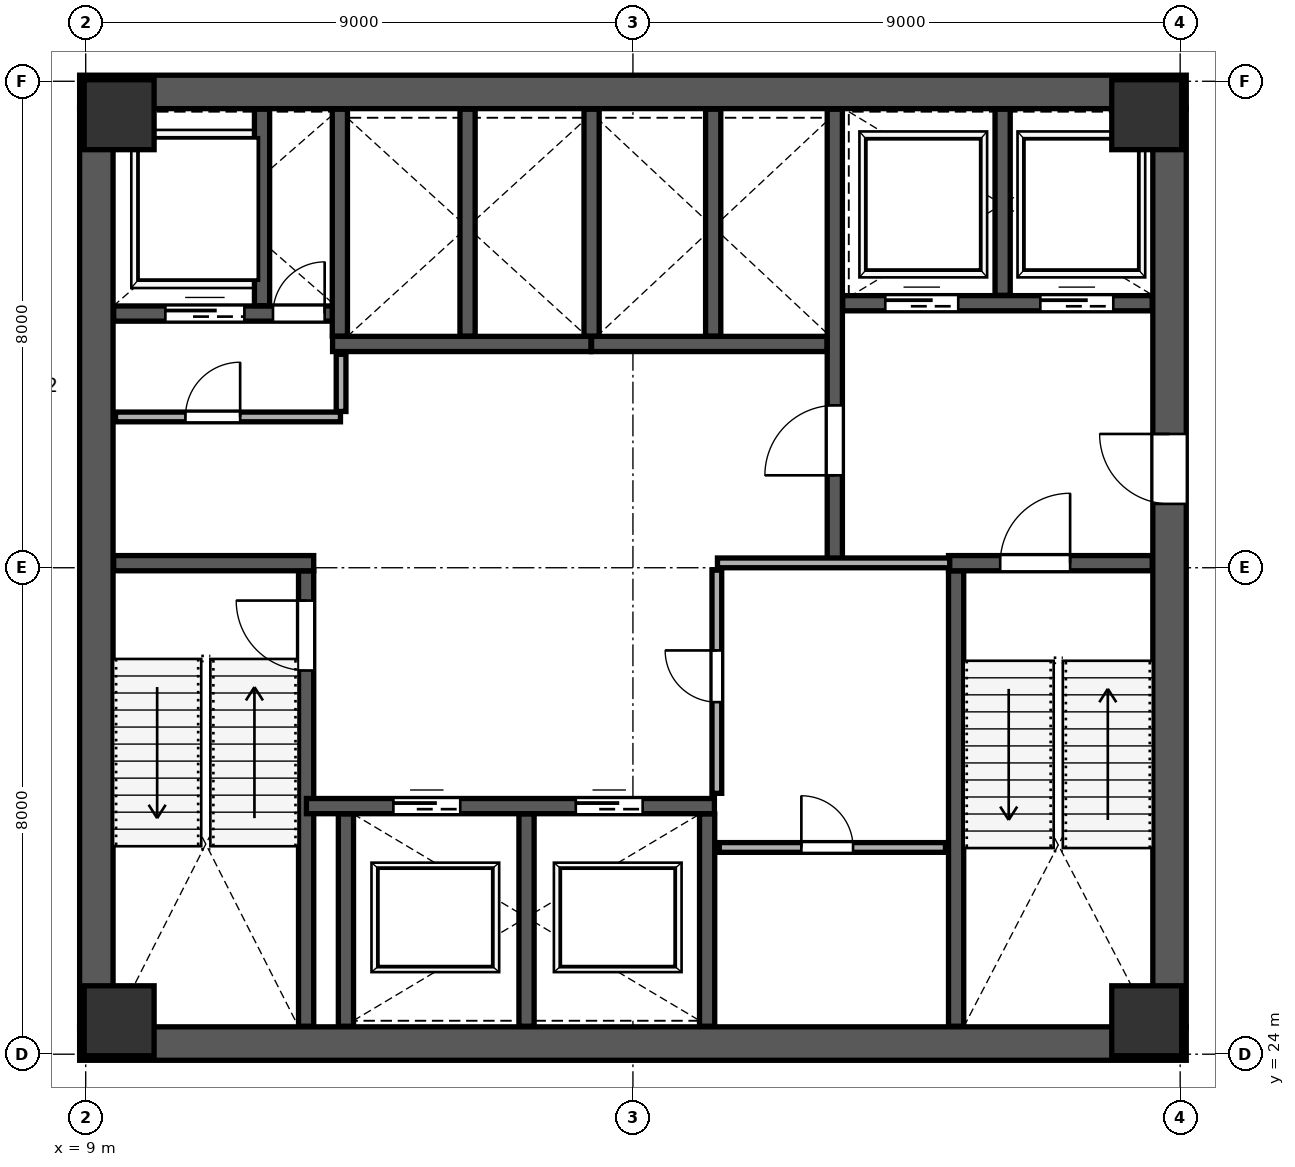
"""IFC4 building model, lengths in metres.
Left out: names, types, materials, properties, quantities, classifications, styles, units other than length and angle.
Written with IfcOpenShell. Run it as: python <this file> out.ifc"""

import sys

from ifc_helpers import new_model, si_unit, direction, frame, frame_2d, origin, origin_2d, place, context, subcontext, project, spatial, rectangle, extrude, source, transform, mapped, element, fill, save


model = new_model("IFC4")
c1 = context("Model", 3, precision=1e-05, world=origin(), true_north=direction((0.0, 1.0)))
c2 = subcontext(c1, "Body", "Model", "MODEL_VIEW")
j1 = project(units=[si_unit("LENGTHUNIT", "METRE"), si_unit("PLANEANGLEUNIT", "RADIAN")], contexts=[c1])
p1 = place(None, origin())
s1 = spatial("IfcSite", under=j1, at=p1, CompositionType="ELEMENT")
p2 = place(p1, origin())
s2 = spatial("IfcBuilding", under=s1, at=p2, CompositionType="ELEMENT")
p3 = place(p2, frame((0.0, 0.0, 100.0)))
s3 = spatial("IfcBuildingStorey", under=s2, at=p3, CompositionType="ELEMENT", Elevation=100.0)
m1 = source(origin(), c2, "Body", "SweptSolid", [
    extrude(rectangle(XDim=1.15, YDim=1.15, at=origin_2d()), origin(), (0.0, 0.0, 1.0), 4.198),
])
for number, where, z_axis, x_axis in (
    (1, (9.55, 24.55, 0.001), (0.0, 0.0, 1.0), (1.0, 0.0, 0.0)),
    (2, (26.45, 24.55, 0.001), (0.0, 0.0, 1.0), (1.0, 0.0, 0.0)),
    (3, (9.55, 39.45, 0.001), (0.0, 0.0, 1.0), (1.0, 0.0, 0.0)),
    (4, (26.45, 39.45, 0.001), (0.0, 0.0, 1.0), (1.0, 0.0, 0.0)),
):
    element("IfcColumn", number, at=place(p3, frame(where, z_axis=z_axis, x_axis=x_axis)), inside=s3, PredefinedType="COLUMN", context=c2, shape_type="MappedRepresentation", body=[
        mapped(m1, transform((0.0, 0.0, 0.0), scale=1.0)),
    ])
p4 = place(p3, frame((9.175, 24.45, 0.0), z_axis=(0.0, 0.0, 1.0), x_axis=(0.0, 1.0, 0.0)))
e5 = element("IfcWall", 5, at=p4, inside=s3, PredefinedType="SHEAR", context=c2, shape_type="SweptSolid", body=[
    extrude(rectangle(XDim=15.1, YDim=0.55, at=frame_2d((7.55, 0.0))), origin(), (0.0, 0.0, 1.0), 3.96),
])
p5 = place(p3, frame((26.825, 24.45, 0.0), z_axis=(0.0, 0.0, 1.0), x_axis=(0.0, 1.0, 0.0)))
e6 = element("IfcWall", 6, at=p5, inside=s3, PredefinedType="SHEAR", context=c2, shape_type="SweptSolid", body=[
    extrude(rectangle(XDim=15.1, YDim=0.55, at=frame_2d((7.55, 0.0))), origin(), (0.0, 0.0, 1.0), 3.96),
])
p6 = place(p5, frame((8.6, 0.0, 0.0)))
e7 = element("IfcOpeningElement", 7, at=p6, cuts=e6, PredefinedType="OPENING", context=c2, shape_type="SweptSolid", body=[
    extrude(rectangle(XDim=1.15, YDim=2.2, at=frame_2d((0.575, 1.1))), frame((0.0, 0.285, 0.0), z_axis=(0.0, -1.0, 0.0), x_axis=(1.0, 0.0, 0.0)), (0.0, 0.0, 1.0), 0.57),
])
for number, where, z_axis, x_axis in (
    (8, (8.9, 24.175, 0.0), (0.0, 0.0, 1.0), (1.0, 0.0, 0.0)),
    (9, (8.9, 39.825, 0.0), (0.0, 0.0, 1.0), (1.0, 0.0, 0.0)),
):
    element("IfcWall", number, at=place(p3, frame(where, z_axis=z_axis, x_axis=x_axis)), inside=s3, PredefinedType="SHEAR", context=c2, shape_type="SweptSolid", body=[
        extrude(rectangle(XDim=18.2, YDim=0.55, at=frame_2d((9.1, 0.0))), origin(), (0.0, 0.0, 1.0), 3.96),
    ])
p7 = place(p3, frame((12.625, 24.46, 0.0), z_axis=(0.0, 0.0, 1.0), x_axis=(0.0, 1.0, 0.0)))
e10 = element("IfcWall", 10, at=p7, inside=s3, PredefinedType="SHEAR", context=c2, shape_type="SweptSolid", body=[
    extrude(rectangle(XDim=7.49, YDim=0.25, at=frame_2d((3.745, 0.0))), origin(), (0.0, 0.0, 1.0), 3.96),
])
p8 = place(p7, frame((5.85, 0.0, 0.0)))
e11 = element("IfcOpeningElement", 11, at=p8, cuts=e10, PredefinedType="OPENING", context=c2, shape_type="SweptSolid", body=[
    extrude(rectangle(XDim=1.15, YDim=2.2, at=frame_2d((0.575, 1.1))), frame((0.0, 0.135, 0.0), z_axis=(0.0, -1.0, 0.0), x_axis=(1.0, 0.0, 0.0)), (0.0, 0.0, 1.0), 0.27),
])
p9 = place(p3, frame((9.46, 32.075, 0.0), z_axis=(0.0, 0.0, 1.0), x_axis=(1.0, 0.0, 0.0)))
e12 = element("IfcWall", 12, at=p9, inside=s3, PredefinedType="SHEAR", context=c2, shape_type="SweptSolid", body=[
    extrude(rectangle(XDim=3.29, YDim=0.25, at=frame_2d((1.645, 0.0))), origin(), (0.0, 0.0, 1.0), 3.96),
])
p10 = place(p3, frame((23.315, 24.46, 0.0), z_axis=(0.0, 0.0, 1.0), x_axis=(0.0, 1.0, 0.0)))
e13 = element("IfcWall", 13, at=p10, inside=s3, PredefinedType="SHEAR", context=c2, shape_type="SweptSolid", body=[
    extrude(rectangle(XDim=7.49, YDim=0.25, at=frame_2d((3.745, 0.0))), origin(), (0.0, 0.0, 1.0), 3.96),
])
p11 = place(p3, frame((23.19, 32.075, 0.0), z_axis=(0.0, 0.0, 1.0), x_axis=(1.0, 0.0, 0.0)))
e14 = element("IfcWall", 14, at=p11, inside=s3, PredefinedType="SHEAR", context=c2, shape_type="SweptSolid", body=[
    extrude(rectangle(XDim=3.35, YDim=0.25, at=frame_2d((1.675, 0.0))), origin(), (0.0, 0.0, 1.0), 3.96),
])
p12 = place(p11, frame((0.85, 0.0, 0.0)))
e15 = element("IfcOpeningElement", 15, at=p12, cuts=e14, PredefinedType="OPENING", context=c2, shape_type="SweptSolid", body=[
    extrude(rectangle(XDim=1.15, YDim=2.2, at=frame_2d((0.575, 1.1))), frame((0.0, 0.135, 0.0), z_axis=(0.0, -1.0, 0.0), x_axis=(1.0, 0.0, 0.0)), (0.0, 0.0, 1.0), 0.27),
])
p13 = place(p3, frame((21.32, 32.12, 0.0), z_axis=(0.0, 0.0, 1.0), x_axis=(0.0, 1.0, 0.0)))
e16 = element("IfcWall", 16, at=p13, inside=s3, PredefinedType="SHEAR", context=c2, shape_type="SweptSolid", body=[
    extrude(rectangle(XDim=7.42, YDim=0.25, at=frame_2d((3.71, 0.0))), origin(), (0.0, 0.0, 1.0), 3.96),
])
p14 = place(p13, frame((1.4, 0.0, 0.0)))
e17 = element("IfcOpeningElement", 17, at=p14, cuts=e16, PredefinedType="OPENING", context=c2, shape_type="SweptSolid", body=[
    extrude(rectangle(XDim=1.15, YDim=2.2, at=frame_2d((0.575, 1.1))), frame((0.0, 0.135, 0.0), z_axis=(0.0, -1.0, 0.0), x_axis=(1.0, 0.0, 0.0)), (0.0, 0.0, 1.0), 0.27),
])
p15 = place(p3, frame((9.46, 36.18, 0.0), z_axis=(0.0, 0.0, 1.0), x_axis=(1.0, 0.0, 0.0)))
e18 = element("IfcWall", 18, at=p15, inside=s3, PredefinedType="SHEAR", context=c2, shape_type="SweptSolid", body=[
    extrude(rectangle(XDim=3.79, YDim=0.25, at=frame_2d((1.895, 0.0))), origin(), (0.0, 0.0, 1.0), 3.96),
])
p16 = place(p15, frame((2.62, 0.0, 0.0)))
e19 = element("IfcOpeningElement", 19, at=p16, cuts=e18, PredefinedType="OPENING", context=c2, shape_type="SweptSolid", body=[
    extrude(rectangle(XDim=0.85, YDim=2.1, at=frame_2d((0.425, 1.05))), frame((0.0, 0.135, 0.0), z_axis=(0.0, -1.0, 0.0), x_axis=(1.0, 0.0, 0.0)), (0.0, 0.0, 1.0), 0.27),
])
p17 = place(p15, frame((0.85, 0.0, 0.0)))
e20 = element("IfcOpeningElement", 20, at=p17, cuts=e18, PredefinedType="OPENING", context=c2, shape_type="SweptSolid", body=[
    extrude(rectangle(XDim=1.3, YDim=2.25, at=frame_2d((0.65, 1.125))), frame((0.0, 0.135, 0.0), z_axis=(0.0, -1.0, 0.0), x_axis=(1.0, 0.0, 0.0)), (0.0, 0.0, 1.0), 0.27),
])
p18 = place(p3, frame((11.9, 36.31, 0.0), z_axis=(0.0, 0.0, 1.0), x_axis=(0.0, 1.0, 0.0)))
e21 = element("IfcWall", 21, at=p18, inside=s3, PredefinedType="SHEAR", context=c2, shape_type="SweptSolid", body=[
    extrude(rectangle(XDim=3.23, YDim=0.25, at=frame_2d((1.615, 0.0))), origin(), (0.0, 0.0, 1.0), 3.96),
])
p19 = place(p3, frame((21.45, 36.35, 0.0), z_axis=(0.0, 0.0, 1.0), x_axis=(1.0, 0.0, 0.0)))
e22 = element("IfcWall", 22, at=p19, inside=s3, PredefinedType="SHEAR", context=c2, shape_type="SweptSolid", body=[
    extrude(rectangle(XDim=5.09, YDim=0.25, at=frame_2d((2.545, 0.0))), origin(), (0.0, 0.0, 1.0), 3.96),
])
p20 = place(p19, frame((0.7, 0.0, 0.0)))
e23 = element("IfcOpeningElement", 23, at=p20, cuts=e22, PredefinedType="OPENING", context=c2, shape_type="SweptSolid", body=[
    extrude(rectangle(XDim=1.2, YDim=2.2, at=frame_2d((0.6, 1.1))), frame((0.0, 0.135, 0.0), z_axis=(0.0, -1.0, 0.0), x_axis=(1.0, 0.0, 0.0)), (0.0, 0.0, 1.0), 0.27),
])
p21 = place(p19, frame((3.25, 0.0, 0.0)))
e24 = element("IfcOpeningElement", 24, at=p21, cuts=e22, PredefinedType="OPENING", context=c2, shape_type="SweptSolid", body=[
    extrude(rectangle(XDim=1.2, YDim=2.2, at=frame_2d((0.6, 1.1))), frame((0.0, 0.135, 0.0), z_axis=(0.0, -1.0, 0.0), x_axis=(1.0, 0.0, 0.0)), (0.0, 0.0, 1.0), 0.27),
])
p22 = place(p3, frame((24.08, 36.48, 0.0), z_axis=(0.0, 0.0, 1.0), x_axis=(0.0, 1.0, 0.0)))
e25 = element("IfcWall", 25, at=p22, inside=s3, PredefinedType="SHEAR", context=c2, shape_type="SweptSolid", body=[
    extrude(rectangle(XDim=3.06, YDim=0.25, at=frame_2d((1.53, 0.0))), origin(), (0.0, 0.0, 1.0), 3.96),
])
p23 = place(p3, frame((12.63, 28.08, 0.0), z_axis=(0.0, 0.0, 1.0), x_axis=(1.0, 0.0, 0.0)))
e26 = element("IfcWall", 26, at=p23, inside=s3, PredefinedType="SHEAR", context=c2, shape_type="SweptSolid", body=[
    extrude(rectangle(XDim=6.71, YDim=0.25, at=frame_2d((3.355, 0.0))), origin(), (0.0, 0.0, 1.0), 3.96),
])
p24 = place(p23, frame((1.43, 0.0, 0.0)))
e27 = element("IfcOpeningElement", 27, at=p24, cuts=e26, PredefinedType="OPENING", context=c2, shape_type="SweptSolid", body=[
    extrude(rectangle(XDim=1.1, YDim=2.2, at=frame_2d((0.55, 1.1))), frame((0.0, 0.135, 0.0), z_axis=(0.0, -1.0, 0.0), x_axis=(1.0, 0.0, 0.0)), (0.0, 0.0, 1.0), 0.27),
])
p25 = place(p23, frame((4.43, 0.0, 0.0)))
e28 = element("IfcOpeningElement", 28, at=p25, cuts=e26, PredefinedType="OPENING", context=c2, shape_type="SweptSolid", body=[
    extrude(rectangle(XDim=1.1, YDim=2.2, at=frame_2d((0.55, 1.1))), frame((0.0, 0.135, 0.0), z_axis=(0.0, -1.0, 0.0), x_axis=(1.0, 0.0, 0.0)), (0.0, 0.0, 1.0), 0.27),
])
for number, where, z_axis, x_axis in (
    (29, (13.28, 24.46, 0.0), (0.0, 0.0, 1.0), (0.0, 1.0, 0.0)),
    (30, (16.25, 24.46, 0.0), (0.0, 0.0, 1.0), (0.0, 1.0, 0.0)),
    (31, (19.22, 24.46, 0.0), (0.0, 0.0, 1.0), (0.0, 1.0, 0.0)),
):
    element("IfcWall", number, at=place(p3, frame(where, z_axis=z_axis, x_axis=x_axis)), inside=s3, PredefinedType="SHEAR", context=c2, shape_type="SweptSolid", body=[
        extrude(rectangle(XDim=3.49, YDim=0.25, at=frame_2d((1.745, 0.0))), origin(), (0.0, 0.0, 1.0), 3.96),
    ])
p26 = place(p3, frame((13.06, 35.68, 0.0), z_axis=(0.0, 0.0, 1.0), x_axis=(1.0, 0.0, 0.0)))
e32 = element("IfcWall", 32, at=p26, inside=s3, PredefinedType="SHEAR", context=c2, shape_type="SweptSolid", body=[
    extrude(rectangle(XDim=4.25, YDim=0.25, at=frame_2d((2.125, 0.0))), origin(), (0.0, 0.0, 1.0), 3.96),
])
for number, where, z_axis, x_axis in (
    (33, (13.18, 35.81, 0.0), (0.0, 0.0, 1.0), (0.0, 1.0, 0.0)),
    (34, (15.28, 35.81, 0.0), (0.0, 0.0, 1.0), (0.0, 1.0, 0.0)),
):
    element("IfcWall", number, at=place(p3, frame(where, z_axis=z_axis, x_axis=x_axis)), inside=s3, PredefinedType="SHEAR", context=c2, shape_type="SweptSolid", body=[
        extrude(rectangle(XDim=3.73, YDim=0.25, at=frame_2d((1.865, 0.0))), origin(), (0.0, 0.0, 1.0), 3.96),
    ])
p27 = place(p3, frame((17.32, 35.68, 0.0), z_axis=(0.0, 0.0, 1.0), x_axis=(1.0, 0.0, 0.0)))
e35 = element("IfcWall", 35, at=p27, inside=s3, PredefinedType="SHEAR", context=c2, shape_type="SweptSolid", body=[
    extrude(rectangle(XDim=3.87, YDim=0.25, at=frame_2d((1.935, 0.0))), origin(), (0.0, 0.0, 1.0), 3.96),
])
for number, where, z_axis, x_axis in (
    (36, (17.32, 35.81, 0.0), (0.0, 0.0, 1.0), (0.0, 1.0, 0.0)),
    (37, (19.32, 35.81, 0.0), (0.0, 0.0, 1.0), (0.0, 1.0, 0.0)),
):
    element("IfcWall", number, at=place(p3, frame(where, z_axis=z_axis, x_axis=x_axis)), inside=s3, PredefinedType="SHEAR", context=c2, shape_type="SweptSolid", body=[
        extrude(rectangle(XDim=3.73, YDim=0.25, at=frame_2d((1.865, 0.0))), origin(), (0.0, 0.0, 1.0), 3.96),
    ])
p28 = place(p3, frame((9.49, 34.48, 0.0), z_axis=(0.0, 0.0, 1.0), x_axis=(1.0, 0.0, 0.0)))
e38 = element("IfcWall", 38, at=p28, inside=s3, PredefinedType="PARTITIONING", context=c2, shape_type="SweptSolid", body=[
    extrude(rectangle(XDim=3.7, YDim=0.16, at=frame_2d((1.85, 0.0))), origin(), (0.0, 0.0, 1.0), 3.96),
])
p29 = place(p28, frame((1.15, 0.0, 0.0)))
e39 = element("IfcOpeningElement", 39, at=p29, cuts=e38, PredefinedType="OPENING", context=c2, shape_type="SweptSolid", body=[
    extrude(rectangle(XDim=0.9, YDim=2.15, at=frame_2d((0.45, 1.075))), frame((0.0, 0.09, 0.0), z_axis=(0.0, -1.0, 0.0), x_axis=(1.0, 0.0, 0.0)), (0.0, 0.0, 1.0), 0.18),
])
p30 = place(p3, frame((13.2, 34.57, 0.0), z_axis=(0.0, 0.0, 1.0), x_axis=(0.0, 1.0, 0.0)))
e40 = element("IfcWall", 40, at=p30, inside=s3, PredefinedType="PARTITIONING", context=c2, shape_type="SweptSolid", body=[
    extrude(rectangle(XDim=0.94, YDim=0.16, at=frame_2d((0.47, 0.0))), origin(), (0.0, 0.0, 1.0), 3.96),
])
p31 = place(p3, frame((19.39, 32.08, 0.0), z_axis=(0.0, 0.0, 1.0), x_axis=(1.0, 0.0, 0.0)))
e41 = element("IfcWall", 41, at=p31, inside=s3, PredefinedType="PARTITIONING", context=c2, shape_type="SweptSolid", body=[
    extrude(rectangle(XDim=3.82, YDim=0.16, at=frame_2d((1.91, 0.0))), origin(), (0.0, 0.0, 1.0), 3.96),
])
p32 = place(p3, frame((19.38, 28.29, 0.0), z_axis=(0.0, 0.0, 1.0), x_axis=(0.0, 1.0, 0.0)))
e42 = element("IfcWall", 42, at=p32, inside=s3, PredefinedType="PARTITIONING", context=c2, shape_type="SweptSolid", body=[
    extrude(rectangle(XDim=3.67, YDim=0.16, at=frame_2d((1.835, 0.0))), origin(), (0.0, 0.0, 1.0), 3.96),
])
p33 = place(p32, frame((1.5, 0.0, 0.0)))
e43 = element("IfcOpeningElement", 43, at=p33, cuts=e42, PredefinedType="OPENING", context=c2, shape_type="SweptSolid", body=[
    extrude(rectangle(XDim=0.85, YDim=2.1, at=frame_2d((0.425, 1.05))), frame((0.0, 0.09, 0.0), z_axis=(0.0, -1.0, 0.0), x_axis=(1.0, 0.0, 0.0)), (0.0, 0.0, 1.0), 0.18),
])
p34 = place(p3, frame((19.42, 27.4, 0.0), z_axis=(0.0, 0.0, 1.0), x_axis=(1.0, 0.0, 0.0)))
e44 = element("IfcWall", 44, at=p34, inside=s3, PredefinedType="PARTITIONING", context=c2, shape_type="SweptSolid", body=[
    extrude(rectangle(XDim=3.72, YDim=0.16, at=frame_2d((1.86, 0.0))), origin(), (0.0, 0.0, 1.0), 3.96),
])
p35 = place(p34, frame((1.35, 0.0, 0.0)))
e45 = element("IfcOpeningElement", 45, at=p35, cuts=e44, PredefinedType="OPENING", context=c2, shape_type="SweptSolid", body=[
    extrude(rectangle(XDim=0.85, YDim=2.1, at=frame_2d((0.425, 1.05))), frame((0.0, 0.09, 0.0), z_axis=(0.0, -1.0, 0.0), x_axis=(1.0, 0.0, 0.0)), (0.0, 0.0, 1.0), 0.18),
])
p36 = place(p3, frame((8.071, 46.831, 0.0), z_axis=(0.0, 0.0, 1.0), x_axis=(0.965925848141, -0.258818963551, 0.0)))
e46 = element("IfcWall", 46, at=p36, inside=s3, PredefinedType="PARTITIONING", context=c2, shape_type="SweptSolid", body=[
    extrude(rectangle(XDim=26.16, YDim=0.115, at=frame_2d((13.08, 0.0))), origin(), (0.0, 0.0, 1.0), 3.96),
])
p37 = place(p36, frame((1.05, 0.0, 0.0)))
e47 = element("IfcOpeningElement", 47, at=p37, cuts=e46, PredefinedType="OPENING", context=c2, shape_type="SweptSolid", body=[
    extrude(rectangle(XDim=0.95, YDim=2.15, at=frame_2d((0.475, 1.075))), frame((0.0, 0.067, 0.0), z_axis=(0.0, -1.0, 0.0), x_axis=(1.0, 0.0, 0.0)), (0.0, 0.0, 1.0), 0.135),
])
p38 = place(p3, frame((25.906, 12.164, 0.0), z_axis=(0.0, 0.0, 1.0), x_axis=(0.258805595447, 0.965929430013, 0.0)))
e48 = element("IfcWall", 48, at=p38, inside=s3, PredefinedType="PARTITIONING", context=c2, shape_type="SweptSolid", body=[
    extrude(rectangle(XDim=19.78, YDim=0.16, at=frame_2d((9.89, 0.0))), origin(), (0.0, 0.0, 1.0), 3.96),
])
m2 = source(origin(), c2, "Body", "SweptSolid", [
    extrude(rectangle(XDim=1.15, YDim=2.2, at=frame_2d((0.575, 1.1))), frame((0.0, 0.025, 0.0), z_axis=(0.0, -1.0, 0.0), x_axis=(1.0, 0.0, 0.0)), (0.0, 0.0, 1.0), 0.05),
])
p39 = place(p8, origin())
e49 = element("IfcDoor", 49, at=p39, inside=s3, OperationType="SINGLE_SWING_RIGHT", PredefinedType="DOOR", context=c2, shape_type="MappedRepresentation", body=[
    mapped(m2, transform((0.0, 0.0, 0.0), scale=1.0)),
])
fill(e11, e49)
m3 = source(origin(), c2, "Body", "SweptSolid", [
    extrude(rectangle(XDim=1.15, YDim=2.2, at=frame_2d((0.575, 1.1))), frame((0.0, 0.025, 0.0), z_axis=(0.0, -1.0, 0.0), x_axis=(1.0, 0.0, 0.0)), (0.0, 0.0, 1.0), 0.05),
])
p40 = place(p14, origin())
e50 = element("IfcDoor", 50, at=p40, inside=s3, OperationType="SINGLE_SWING_LEFT", PredefinedType="DOOR", context=c2, shape_type="MappedRepresentation", body=[
    mapped(m3, transform((0.0, 0.0, 0.0), scale=1.0)),
])
fill(e17, e50)
p41 = place(p12, origin())
e51 = element("IfcDoor", 51, at=p41, inside=s3, OperationType="SINGLE_SWING_RIGHT", PredefinedType="DOOR", context=c2, shape_type="MappedRepresentation", body=[
    mapped(m2, transform((0.0, 0.0, 0.0), scale=1.0)),
])
fill(e15, e51)
p42 = place(p6, origin())
e52 = element("IfcDoor", 52, at=p42, inside=s3, OperationType="SINGLE_SWING_RIGHT", PredefinedType="DOOR", context=c2, shape_type="MappedRepresentation", body=[
    mapped(m3, transform((0.0, 0.0, 0.0), scale=1.0)),
])
fill(e7, e52)
m4 = source(origin(), c2, "Body", "SweptSolid", [
    extrude(rectangle(XDim=0.85, YDim=2.1, at=frame_2d((0.425, 1.05))), frame((0.0, 0.025, 0.0), z_axis=(0.0, -1.0, 0.0), x_axis=(1.0, 0.0, 0.0)), (0.0, 0.0, 1.0), 0.05),
])
p43 = place(p16, origin())
e53 = element("IfcDoor", 53, at=p43, inside=s3, OperationType="SINGLE_SWING_RIGHT", PredefinedType="DOOR", context=c2, shape_type="MappedRepresentation", body=[
    mapped(m4, transform((0.0, 0.0, 0.0), scale=1.0)),
])
fill(e19, e53)
m5 = source(origin(), c2, "Body", "SweptSolid", [
    extrude(rectangle(XDim=1.1, YDim=2.2, at=frame_2d((0.55, 1.1))), frame((0.0, 0.025, 0.0), z_axis=(0.0, -1.0, 0.0), x_axis=(1.0, 0.0, 0.0)), (0.0, 0.0, 1.0), 0.05),
])
p44 = place(p24, origin())
e54 = element("IfcDoor", 54, at=p44, inside=s3, OperationType="SLIDING_TO_LEFT", PredefinedType="DOOR", context=c2, shape_type="MappedRepresentation", body=[
    mapped(m5, transform((0.0, 0.0, 0.0), scale=1.0)),
])
fill(e27, e54)
p45 = place(p25, origin())
e55 = element("IfcDoor", 55, at=p45, inside=s3, OperationType="SLIDING_TO_RIGHT", PredefinedType="DOOR", context=c2, shape_type="MappedRepresentation", body=[
    mapped(m5, transform((0.0, 0.0, 0.0), scale=1.0)),
])
fill(e28, e55)
m6 = source(origin(), c2, "Body", "SweptSolid", [
    extrude(rectangle(XDim=1.2, YDim=2.2, at=frame_2d((0.6, 1.1))), frame((0.0, 0.025, 0.0), z_axis=(0.0, -1.0, 0.0), x_axis=(1.0, 0.0, 0.0)), (0.0, 0.0, 1.0), 0.05),
])
p46 = place(p20, origin())
e56 = element("IfcDoor", 56, at=p46, inside=s3, OperationType="SLIDING_TO_LEFT", PredefinedType="DOOR", context=c2, shape_type="MappedRepresentation", body=[
    mapped(m6, transform((0.0, 0.0, 0.0), scale=1.0)),
])
fill(e23, e56)
p47 = place(p21, origin())
e57 = element("IfcDoor", 57, at=p47, inside=s3, OperationType="SLIDING_TO_RIGHT", PredefinedType="DOOR", context=c2, shape_type="MappedRepresentation", body=[
    mapped(m6, transform((0.0, 0.0, 0.0), scale=1.0)),
])
fill(e24, e57)
m7 = source(origin(), c2, "Body", "SweptSolid", [
    extrude(rectangle(XDim=1.3, YDim=2.25, at=frame_2d((0.65, 1.125))), frame((0.0, 0.025, 0.0), z_axis=(0.0, -1.0, 0.0), x_axis=(1.0, 0.0, 0.0)), (0.0, 0.0, 1.0), 0.05),
])
p48 = place(p17, origin())
e58 = element("IfcDoor", 58, at=p48, inside=s3, OperationType="SLIDING_TO_LEFT", PredefinedType="DOOR", context=c2, shape_type="MappedRepresentation", body=[
    mapped(m7, transform((0.0, 0.0, 0.0), scale=1.0)),
])
fill(e20, e58)
m8 = source(origin(), c2, "Body", "SweptSolid", [
    extrude(rectangle(XDim=0.9, YDim=2.15, at=frame_2d((0.45, 1.075))), frame((0.0, 0.025, 0.0), z_axis=(0.0, -1.0, 0.0), x_axis=(1.0, 0.0, 0.0)), (0.0, 0.0, 1.0), 0.05),
])
p49 = place(p29, origin())
e59 = element("IfcDoor", 59, at=p49, inside=s3, OperationType="SINGLE_SWING_RIGHT", PredefinedType="DOOR", context=c2, shape_type="MappedRepresentation", body=[
    mapped(m8, transform((0.0, 0.0, 0.0), scale=1.0)),
])
fill(e39, e59)
p50 = place(p35, origin())
e60 = element("IfcDoor", 60, at=p50, inside=s3, OperationType="SINGLE_SWING_LEFT", PredefinedType="DOOR", context=c2, shape_type="MappedRepresentation", body=[
    mapped(m4, transform((0.0, 0.0, 0.0), scale=1.0)),
])
fill(e45, e60)
p51 = place(p33, origin())
e61 = element("IfcDoor", 61, at=p51, inside=s3, OperationType="SINGLE_SWING_RIGHT", PredefinedType="DOOR", context=c2, shape_type="MappedRepresentation", body=[
    mapped(m4, transform((0.0, 0.0, 0.0), scale=1.0)),
])
fill(e43, e61)
save(model, sys.argv[1])
